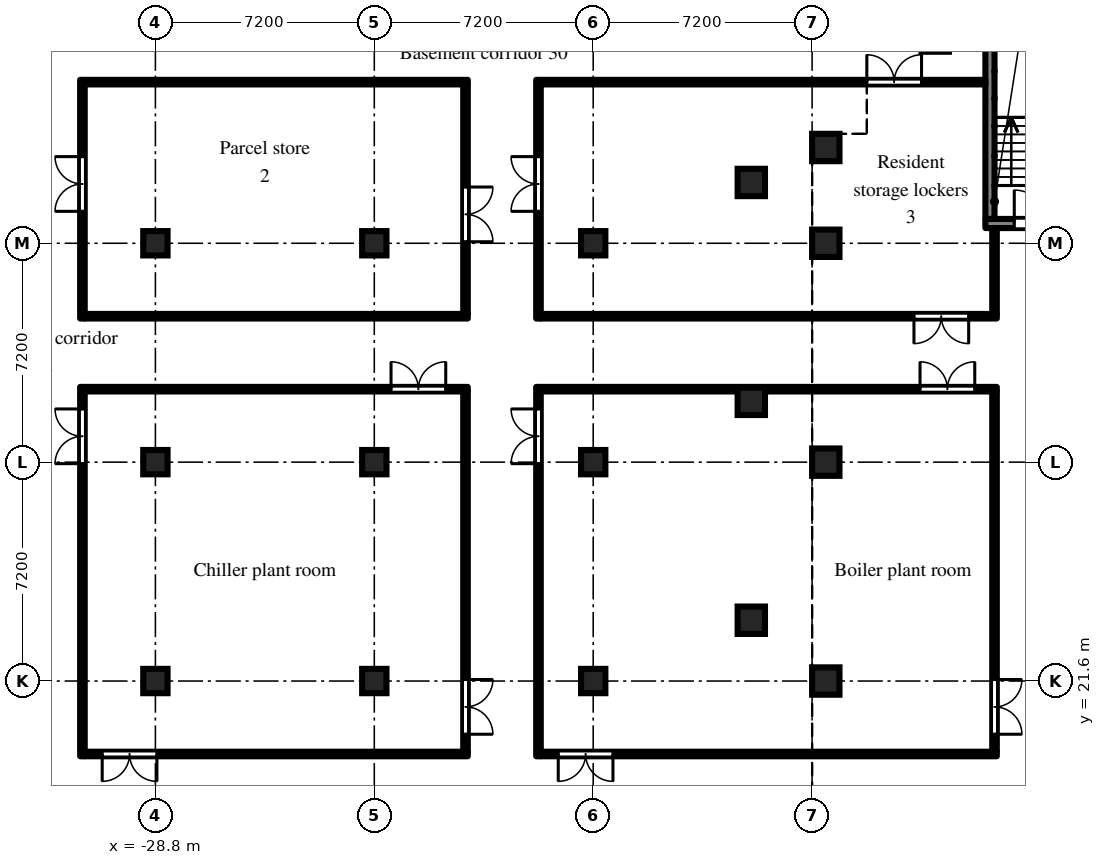
"""IFC4 building model, lengths in metres.
Left out: names, types, materials, properties, quantities, classifications, styles, units other than length and angle.
Written with IfcOpenShell. Run it as: python <this file> out.ifc"""

import sys

from ifc_helpers import new_model, si_unit, direction, frame, frame_2d, origin, origin_2d, place, context, subcontext, project, spatial, rectangle, extrude, element, fill, save


model = new_model("IFC4")
c1 = context("Model", 3, precision=1e-05, world=origin(), true_north=direction((0.0, 1.0)))
c2 = subcontext(c1, "Body", "Model", "MODEL_VIEW")
j1 = project(units=[si_unit("LENGTHUNIT", "METRE"), si_unit("PLANEANGLEUNIT", "RADIAN")], contexts=[c1])
p1 = place(None, origin())
s1 = spatial("IfcSite", under=j1, at=p1, CompositionType="ELEMENT")
p2 = place(p1, origin())
s2 = spatial("IfcBuilding", under=s1, at=p2, CompositionType="ELEMENT")
p3 = place(p2, frame((0.0, 0.0, -4.8)))
s3 = spatial("IfcBuildingStorey", under=s2, at=p3, CompositionType="ELEMENT", Elevation=-4.8)
for number, where, z_axis, x_axis in (
    (1, (-6.75, 21.6, -0.5), (0.0, 0.0, 1.0), (1.0, 0.0, 0.0)),
    (2, (-6.75, 28.8, -0.5), (0.0, 0.0, 1.0), (1.0, 0.0, 0.0)),
    (3, (-6.75, 36.0, -0.5), (0.0, 0.0, 1.0), (1.0, 0.0, 0.0)),
    (4, (-6.75, 39.15, -0.5), (0.0, 0.0, 1.0), (1.0, 0.0, 0.0)),
):
    element("IfcColumn", number, at=place(p3, frame(where, z_axis=z_axis, x_axis=x_axis)), inside=s3, PredefinedType="COLUMN", context=c2, shape_type="SweptSolid", body=[
        extrude(rectangle(XDim=0.9, YDim=0.9, at=origin_2d()), origin(), (0.0, 0.0, 1.0), 5.3),
    ])
for number, where, z_axis, x_axis in (
    (5, (-28.8, 21.6, -0.5), (0.0, 0.0, 1.0), (1.0, 0.0, 0.0)),
    (6, (-28.8, 28.8, -0.5), (0.0, 0.0, 1.0), (1.0, 0.0, 0.0)),
    (7, (-28.8, 36.0, -0.5), (0.0, 0.0, 1.0), (1.0, 0.0, 0.0)),
    (8, (-21.6, 21.6, -0.5), (0.0, 0.0, 1.0), (1.0, 0.0, 0.0)),
    (9, (-21.6, 28.8, -0.5), (0.0, 0.0, 1.0), (1.0, 0.0, 0.0)),
    (10, (-21.6, 36.0, -0.5), (0.0, 0.0, 1.0), (1.0, 0.0, 0.0)),
    (11, (-14.4, 21.6, -0.5), (0.0, 0.0, 1.0), (1.0, 0.0, 0.0)),
    (12, (-14.4, 28.8, -0.5), (0.0, 0.0, 1.0), (1.0, 0.0, 0.0)),
    (13, (-14.4, 36.0, -0.5), (0.0, 0.0, 1.0), (1.0, 0.0, 0.0)),
):
    element("IfcColumn", number, at=place(p3, frame(where, z_axis=z_axis, x_axis=x_axis)), inside=s3, PredefinedType="COLUMN", context=c2, shape_type="SweptSolid", body=[
        extrude(rectangle(XDim=0.8, YDim=0.8, at=origin_2d()), origin(), (0.0, 0.0, 1.0), 5.3),
    ])
for number, where, z_axis, x_axis in (
    (14, (-9.2, 23.6, -0.5), (0.0, 0.0, 1.0), (1.0, 0.0, 0.0)),
    (15, (-9.2, 30.8, -0.5), (0.0, 0.0, 1.0), (1.0, 0.0, 0.0)),
    (16, (-9.2, 38.0, -0.5), (0.0, 0.0, 1.0), (1.0, 0.0, 0.0)),
):
    element("IfcColumn", number, at=place(p3, frame(where, z_axis=z_axis, x_axis=x_axis)), inside=s3, PredefinedType="COLUMN", context=c2, shape_type="SweptSolid", body=[
        extrude(rectangle(XDim=0.9, YDim=0.9, at=origin_2d()), origin(), (0.0, 0.0, 1.0), 5.3),
    ])
p4 = place(p3, frame((-1.5, 36.65, 0.0), z_axis=(0.0, 0.0, 1.0), x_axis=(1.0, 0.0, 0.0)))
e17 = element("IfcWall", 17, at=p4, inside=s3, PredefinedType="SHEAR", context=c2, shape_type="SweptSolid", body=[
    extrude(rectangle(XDim=3.0, YDim=0.3, at=frame_2d((1.5, 0.0))), origin(), (0.0, 0.0, 1.0), 4.35),
])
p5 = place(p4, frame((0.95, 0.0, 0.0)))
e18 = element("IfcOpeningElement", 18, at=p5, cuts=e17, PredefinedType="OPENING", context=c2, shape_type="SweptSolid", body=[
    extrude(rectangle(XDim=1.1, YDim=2.1, at=frame_2d((0.55, 1.05))), frame((0.0, 0.16, 0.0), z_axis=(0.0, -1.0, 0.0), x_axis=(1.0, 0.0, 0.0)), (0.0, 0.0, 1.0), 0.32),
])
p6 = place(p3, frame((-1.35, 36.8, 0.0), z_axis=(0.0, 0.0, 1.0), x_axis=(0.0, 1.0, 0.0)))
e19 = element("IfcWall", 19, at=p6, inside=s3, PredefinedType="SHEAR", context=c2, shape_type="SweptSolid", body=[
    extrude(rectangle(XDim=5.8, YDim=0.3, at=frame_2d((2.9, 0.0))), origin(), (0.0, 0.0, 1.0), 4.35),
])
p7 = place(p3, frame((-31.2, 19.125, 0.0), z_axis=(0.0, 0.0, 1.0), x_axis=(0.0, 1.0, 0.0)))
e20 = element("IfcWall", 20, at=p7, inside=s3, PredefinedType="PARTITIONING", context=c2, shape_type="SweptSolid", body=[
    extrude(rectangle(XDim=12.15, YDim=0.15, at=frame_2d((6.075, 0.0))), origin(), (0.0, 0.0, 1.0), 4.35),
])
p8 = place(p7, frame((9.625, 0.0, 0.0)))
e21 = element("IfcOpeningElement", 21, at=p8, cuts=e20, PredefinedType="OPENING", context=c2, shape_type="SweptSolid", body=[
    extrude(rectangle(XDim=1.8, YDim=2.1, at=frame_2d((0.9, 1.05))), frame((0.0, 0.085, 0.0), z_axis=(0.0, -1.0, 0.0), x_axis=(1.0, 0.0, 0.0)), (0.0, 0.0, 1.0), 0.17),
])
p9 = place(p3, frame((-31.125, 19.2, 0.0), z_axis=(0.0, 0.0, 1.0), x_axis=(1.0, 0.0, 0.0)))
e22 = element("IfcWall", 22, at=p9, inside=s3, PredefinedType="PARTITIONING", context=c2, shape_type="SweptSolid", body=[
    extrude(rectangle(XDim=12.6, YDim=0.15, at=frame_2d((6.3, 0.0))), origin(), (0.0, 0.0, 1.0), 4.35),
])
p10 = place(p9, frame((0.575, 0.0, 0.0)))
e23 = element("IfcOpeningElement", 23, at=p10, cuts=e22, PredefinedType="OPENING", context=c2, shape_type="SweptSolid", body=[
    extrude(rectangle(XDim=1.8, YDim=2.1, at=frame_2d((0.9, 1.05))), frame((0.0, 0.085, 0.0), z_axis=(0.0, -1.0, 0.0), x_axis=(1.0, 0.0, 0.0)), (0.0, 0.0, 1.0), 0.17),
])
p11 = place(p3, frame((-31.125, 31.2, 0.0), z_axis=(0.0, 0.0, 1.0), x_axis=(1.0, 0.0, 0.0)))
e24 = element("IfcWall", 24, at=p11, inside=s3, PredefinedType="PARTITIONING", context=c2, shape_type="SweptSolid", body=[
    extrude(rectangle(XDim=12.6, YDim=0.15, at=frame_2d((6.3, 0.0))), origin(), (0.0, 0.0, 1.0), 4.35),
])
p12 = place(p11, frame((10.075, 0.0, 0.0)))
e25 = element("IfcOpeningElement", 25, at=p12, cuts=e24, PredefinedType="OPENING", context=c2, shape_type="SweptSolid", body=[
    extrude(rectangle(XDim=1.8, YDim=2.1, at=frame_2d((0.9, 1.05))), frame((0.0, 0.085, 0.0), z_axis=(0.0, -1.0, 0.0), x_axis=(1.0, 0.0, 0.0)), (0.0, 0.0, 1.0), 0.17),
])
p13 = place(p3, frame((-31.2, 33.525, 0.0), z_axis=(0.0, 0.0, 1.0), x_axis=(0.0, 1.0, 0.0)))
e26 = element("IfcWall", 26, at=p13, inside=s3, PredefinedType="PARTITIONING", context=c2, shape_type="SweptSolid", body=[
    extrude(rectangle(XDim=7.85, YDim=0.15, at=frame_2d((3.925, 0.0))), origin(), (0.0, 0.0, 1.0), 4.35),
])
p14 = place(p13, frame((3.525, 0.0, 0.0)))
e27 = element("IfcOpeningElement", 27, at=p14, cuts=e26, PredefinedType="OPENING", context=c2, shape_type="SweptSolid", body=[
    extrude(rectangle(XDim=1.8, YDim=2.1, at=frame_2d((0.9, 1.05))), frame((0.0, 0.085, 0.0), z_axis=(0.0, -1.0, 0.0), x_axis=(1.0, 0.0, 0.0)), (0.0, 0.0, 1.0), 0.17),
])
for number, where, z_axis, x_axis in (
    (28, (-31.125, 33.6, 0.0), (0.0, 0.0, 1.0), (1.0, 0.0, 0.0)),
    (29, (-31.125, 41.3, 0.0), (0.0, 0.0, 1.0), (1.0, 0.0, 0.0)),
):
    element("IfcWall", number, at=place(p3, frame(where, z_axis=z_axis, x_axis=x_axis)), inside=s3, PredefinedType="PARTITIONING", context=c2, shape_type="SweptSolid", body=[
        extrude(rectangle(XDim=12.6, YDim=0.15, at=frame_2d((6.3, 0.0))), origin(), (0.0, 0.0, 1.0), 4.35),
    ])
p15 = place(p3, frame((-18.6, 19.275, 0.0), z_axis=(0.0, 0.0, 1.0), x_axis=(0.0, 1.0, 0.0)))
e30 = element("IfcWall", 30, at=p15, inside=s3, PredefinedType="PARTITIONING", context=c2, shape_type="SweptSolid", body=[
    extrude(rectangle(XDim=11.85, YDim=0.15, at=frame_2d((5.925, 0.0))), origin(), (0.0, 0.0, 1.0), 4.35),
])
p16 = place(p15, frame((0.575, 0.0, 0.0)))
e31 = element("IfcOpeningElement", 31, at=p16, cuts=e30, PredefinedType="OPENING", context=c2, shape_type="SweptSolid", body=[
    extrude(rectangle(XDim=1.8, YDim=2.1, at=frame_2d((0.9, 1.05))), frame((0.0, 0.085, 0.0), z_axis=(0.0, -1.0, 0.0), x_axis=(1.0, 0.0, 0.0)), (0.0, 0.0, 1.0), 0.17),
])
p17 = place(p3, frame((-18.6, 33.675, 0.0), z_axis=(0.0, 0.0, 1.0), x_axis=(0.0, 1.0, 0.0)))
e32 = element("IfcWall", 32, at=p17, inside=s3, PredefinedType="PARTITIONING", context=c2, shape_type="SweptSolid", body=[
    extrude(rectangle(XDim=7.55, YDim=0.15, at=frame_2d((3.775, 0.0))), origin(), (0.0, 0.0, 1.0), 4.35),
])
p18 = place(p17, frame((2.375, 0.0, 0.0)))
e33 = element("IfcOpeningElement", 33, at=p18, cuts=e32, PredefinedType="OPENING", context=c2, shape_type="SweptSolid", body=[
    extrude(rectangle(XDim=1.8, YDim=2.1, at=frame_2d((0.9, 1.05))), frame((0.0, 0.085, 0.0), z_axis=(0.0, -1.0, 0.0), x_axis=(1.0, 0.0, 0.0)), (0.0, 0.0, 1.0), 0.17),
])
p19 = place(p3, frame((-16.2, 19.125, 0.0), z_axis=(0.0, 0.0, 1.0), x_axis=(0.0, 1.0, 0.0)))
e34 = element("IfcWall", 34, at=p19, inside=s3, PredefinedType="PARTITIONING", context=c2, shape_type="SweptSolid", body=[
    extrude(rectangle(XDim=12.15, YDim=0.15, at=frame_2d((6.075, 0.0))), origin(), (0.0, 0.0, 1.0), 4.35),
])
p20 = place(p19, frame((9.625, 0.0, 0.0)))
e35 = element("IfcOpeningElement", 35, at=p20, cuts=e34, PredefinedType="OPENING", context=c2, shape_type="SweptSolid", body=[
    extrude(rectangle(XDim=1.8, YDim=2.1, at=frame_2d((0.9, 1.05))), frame((0.0, 0.085, 0.0), z_axis=(0.0, -1.0, 0.0), x_axis=(1.0, 0.0, 0.0)), (0.0, 0.0, 1.0), 0.17),
])
p21 = place(p3, frame((-16.125, 19.2, 0.0), z_axis=(0.0, 0.0, 1.0), x_axis=(1.0, 0.0, 0.0)))
e36 = element("IfcWall", 36, at=p21, inside=s3, PredefinedType="PARTITIONING", context=c2, shape_type="SweptSolid", body=[
    extrude(rectangle(XDim=15.0, YDim=0.15, at=frame_2d((7.5, 0.0))), origin(), (0.0, 0.0, 1.0), 4.35),
])
p22 = place(p21, frame((0.575, 0.0, 0.0)))
e37 = element("IfcOpeningElement", 37, at=p22, cuts=e36, PredefinedType="OPENING", context=c2, shape_type="SweptSolid", body=[
    extrude(rectangle(XDim=1.8, YDim=2.1, at=frame_2d((0.9, 1.05))), frame((0.0, 0.085, 0.0), z_axis=(0.0, -1.0, 0.0), x_axis=(1.0, 0.0, 0.0)), (0.0, 0.0, 1.0), 0.17),
])
p23 = place(p3, frame((-16.125, 31.2, 0.0), z_axis=(0.0, 0.0, 1.0), x_axis=(1.0, 0.0, 0.0)))
e38 = element("IfcWall", 38, at=p23, inside=s3, PredefinedType="PARTITIONING", context=c2, shape_type="SweptSolid", body=[
    extrude(rectangle(XDim=15.0, YDim=0.15, at=frame_2d((7.5, 0.0))), origin(), (0.0, 0.0, 1.0), 4.35),
])
p24 = place(p23, frame((12.475, 0.0, 0.0)))
e39 = element("IfcOpeningElement", 39, at=p24, cuts=e38, PredefinedType="OPENING", context=c2, shape_type="SweptSolid", body=[
    extrude(rectangle(XDim=1.8, YDim=2.1, at=frame_2d((0.9, 1.05))), frame((0.0, 0.085, 0.0), z_axis=(0.0, -1.0, 0.0), x_axis=(1.0, 0.0, 0.0)), (0.0, 0.0, 1.0), 0.17),
])
p25 = place(p3, frame((-16.2, 33.525, 0.0), z_axis=(0.0, 0.0, 1.0), x_axis=(0.0, 1.0, 0.0)))
e40 = element("IfcWall", 40, at=p25, inside=s3, PredefinedType="PARTITIONING", context=c2, shape_type="SweptSolid", body=[
    extrude(rectangle(XDim=7.85, YDim=0.15, at=frame_2d((3.925, 0.0))), origin(), (0.0, 0.0, 1.0), 4.35),
])
p26 = place(p25, frame((3.525, 0.0, 0.0)))
e41 = element("IfcOpeningElement", 41, at=p26, cuts=e40, PredefinedType="OPENING", context=c2, shape_type="SweptSolid", body=[
    extrude(rectangle(XDim=1.8, YDim=2.1, at=frame_2d((0.9, 1.05))), frame((0.0, 0.085, 0.0), z_axis=(0.0, -1.0, 0.0), x_axis=(1.0, 0.0, 0.0)), (0.0, 0.0, 1.0), 0.17),
])
p27 = place(p3, frame((-16.125, 33.6, 0.0), z_axis=(0.0, 0.0, 1.0), x_axis=(1.0, 0.0, 0.0)))
e42 = element("IfcWall", 42, at=p27, inside=s3, PredefinedType="PARTITIONING", context=c2, shape_type="SweptSolid", body=[
    extrude(rectangle(XDim=15.0, YDim=0.15, at=frame_2d((7.5, 0.0))), origin(), (0.0, 0.0, 1.0), 4.35),
])
p28 = place(p27, frame((12.275, 0.0, 0.0)))
e43 = element("IfcOpeningElement", 43, at=p28, cuts=e42, PredefinedType="OPENING", context=c2, shape_type="SweptSolid", body=[
    extrude(rectangle(XDim=1.8, YDim=2.1, at=frame_2d((0.9, 1.05))), frame((0.0, 0.085, 0.0), z_axis=(0.0, -1.0, 0.0), x_axis=(1.0, 0.0, 0.0)), (0.0, 0.0, 1.0), 0.17),
])
p29 = place(p3, frame((-16.125, 41.3, 0.0), z_axis=(0.0, 0.0, 1.0), x_axis=(1.0, 0.0, 0.0)))
e44 = element("IfcWall", 44, at=p29, inside=s3, PredefinedType="PARTITIONING", context=c2, shape_type="SweptSolid", body=[
    extrude(rectangle(XDim=14.625, YDim=0.15, at=frame_2d((7.312, 0.0))), origin(), (0.0, 0.0, 1.0), 4.35),
])
p30 = place(p29, frame((10.725, 0.0, 0.0)))
e45 = element("IfcOpeningElement", 45, at=p30, cuts=e44, PredefinedType="OPENING", context=c2, shape_type="SweptSolid", body=[
    extrude(rectangle(XDim=1.8, YDim=2.1, at=frame_2d((0.9, 1.05))), frame((0.0, 0.085, 0.0), z_axis=(0.0, -1.0, 0.0), x_axis=(1.0, 0.0, 0.0)), (0.0, 0.0, 1.0), 0.17),
])
p31 = place(p3, frame((-1.2, 19.275, 0.0), z_axis=(0.0, 0.0, 1.0), x_axis=(0.0, 1.0, 0.0)))
e46 = element("IfcWall", 46, at=p31, inside=s3, PredefinedType="PARTITIONING", context=c2, shape_type="SweptSolid", body=[
    extrude(rectangle(XDim=11.85, YDim=0.15, at=frame_2d((5.925, 0.0))), origin(), (0.0, 0.0, 1.0), 4.35),
])
p32 = place(p31, frame((0.575, 0.0, 0.0)))
e47 = element("IfcOpeningElement", 47, at=p32, cuts=e46, PredefinedType="OPENING", context=c2, shape_type="SweptSolid", body=[
    extrude(rectangle(XDim=1.8, YDim=2.1, at=frame_2d((0.9, 1.05))), frame((0.0, 0.085, 0.0), z_axis=(0.0, -1.0, 0.0), x_axis=(1.0, 0.0, 0.0)), (0.0, 0.0, 1.0), 0.17),
])
p33 = place(p3, frame((-1.2, 33.675, 0.0), z_axis=(0.0, 0.0, 1.0), x_axis=(0.0, 1.0, 0.0)))
e48 = element("IfcWall", 48, at=p33, inside=s3, PredefinedType="PARTITIONING", context=c2, shape_type="SweptSolid", body=[
    extrude(rectangle(XDim=2.825, YDim=0.15, at=frame_2d((1.413, 0.0))), origin(), (0.0, 0.0, 1.0), 4.35),
])
p34 = place(p5, origin())
e49 = element("IfcDoor", 49, at=p34, inside=s3, OperationType="SINGLE_SWING_LEFT", PredefinedType="DOOR", context=c2, shape_type="SweptSolid", body=[
    extrude(rectangle(XDim=1.1, YDim=2.1, at=frame_2d((0.55, 1.05))), frame((0.0, 0.025, 0.0), z_axis=(0.0, -1.0, 0.0), x_axis=(1.0, 0.0, 0.0)), (0.0, 0.0, 1.0), 0.05),
])
fill(e18, e49)
p35 = place(p20, origin())
e50 = element("IfcDoor", 50, at=p35, inside=s3, OperationType="DOUBLE_DOOR_DOUBLE_SWING", PredefinedType="DOOR", context=c2, shape_type="SweptSolid", body=[
    extrude(rectangle(XDim=1.8, YDim=2.1, at=frame_2d((0.9, 1.05))), frame((0.0, 0.025, 0.0), z_axis=(0.0, -1.0, 0.0), x_axis=(1.0, 0.0, 0.0)), (0.0, 0.0, 1.0), 0.05),
])
fill(e35, e50)
p36 = place(p22, frame((1.8, 0.0, 0.0), z_axis=(0.0, 0.0, 1.0), x_axis=(-1.0, 0.0, 0.0)))
e51 = element("IfcDoor", 51, at=p36, inside=s3, OperationType="DOUBLE_DOOR_DOUBLE_SWING", PredefinedType="DOOR", context=c2, shape_type="SweptSolid", body=[
    extrude(rectangle(XDim=1.8, YDim=2.1, at=frame_2d((0.9, 1.05))), frame((0.0, 0.025, 0.0), z_axis=(0.0, -1.0, 0.0), x_axis=(1.0, 0.0, 0.0)), (0.0, 0.0, 1.0), 0.05),
])
fill(e37, e51)
p37 = place(p24, origin())
e52 = element("IfcDoor", 52, at=p37, inside=s3, OperationType="DOUBLE_DOOR_DOUBLE_SWING", PredefinedType="DOOR", context=c2, shape_type="SweptSolid", body=[
    extrude(rectangle(XDim=1.8, YDim=2.1, at=frame_2d((0.9, 1.05))), frame((0.0, 0.025, 0.0), z_axis=(0.0, -1.0, 0.0), x_axis=(1.0, 0.0, 0.0)), (0.0, 0.0, 1.0), 0.05),
])
fill(e39, e52)
p38 = place(p32, frame((1.8, 0.0, 0.0), z_axis=(0.0, 0.0, 1.0), x_axis=(-1.0, 0.0, 0.0)))
e53 = element("IfcDoor", 53, at=p38, inside=s3, OperationType="DOUBLE_DOOR_DOUBLE_SWING", PredefinedType="DOOR", context=c2, shape_type="SweptSolid", body=[
    extrude(rectangle(XDim=1.8, YDim=2.1, at=frame_2d((0.9, 1.05))), frame((0.0, 0.025, 0.0), z_axis=(0.0, -1.0, 0.0), x_axis=(1.0, 0.0, 0.0)), (0.0, 0.0, 1.0), 0.05),
])
fill(e47, e53)
p39 = place(p8, origin())
e54 = element("IfcDoor", 54, at=p39, inside=s3, OperationType="DOUBLE_DOOR_DOUBLE_SWING", PredefinedType="DOOR", context=c2, shape_type="SweptSolid", body=[
    extrude(rectangle(XDim=1.8, YDim=2.1, at=frame_2d((0.9, 1.05))), frame((0.0, 0.025, 0.0), z_axis=(0.0, -1.0, 0.0), x_axis=(1.0, 0.0, 0.0)), (0.0, 0.0, 1.0), 0.05),
])
fill(e21, e54)
p40 = place(p10, frame((1.8, 0.0, 0.0), z_axis=(0.0, 0.0, 1.0), x_axis=(-1.0, 0.0, 0.0)))
e55 = element("IfcDoor", 55, at=p40, inside=s3, OperationType="DOUBLE_DOOR_DOUBLE_SWING", PredefinedType="DOOR", context=c2, shape_type="SweptSolid", body=[
    extrude(rectangle(XDim=1.8, YDim=2.1, at=frame_2d((0.9, 1.05))), frame((0.0, 0.025, 0.0), z_axis=(0.0, -1.0, 0.0), x_axis=(1.0, 0.0, 0.0)), (0.0, 0.0, 1.0), 0.05),
])
fill(e23, e55)
p41 = place(p12, origin())
e56 = element("IfcDoor", 56, at=p41, inside=s3, OperationType="DOUBLE_DOOR_DOUBLE_SWING", PredefinedType="DOOR", context=c2, shape_type="SweptSolid", body=[
    extrude(rectangle(XDim=1.8, YDim=2.1, at=frame_2d((0.9, 1.05))), frame((0.0, 0.025, 0.0), z_axis=(0.0, -1.0, 0.0), x_axis=(1.0, 0.0, 0.0)), (0.0, 0.0, 1.0), 0.05),
])
fill(e25, e56)
p42 = place(p16, frame((1.8, 0.0, 0.0), z_axis=(0.0, 0.0, 1.0), x_axis=(-1.0, 0.0, 0.0)))
e57 = element("IfcDoor", 57, at=p42, inside=s3, OperationType="DOUBLE_DOOR_DOUBLE_SWING", PredefinedType="DOOR", context=c2, shape_type="SweptSolid", body=[
    extrude(rectangle(XDim=1.8, YDim=2.1, at=frame_2d((0.9, 1.05))), frame((0.0, 0.025, 0.0), z_axis=(0.0, -1.0, 0.0), x_axis=(1.0, 0.0, 0.0)), (0.0, 0.0, 1.0), 0.05),
])
fill(e31, e57)
p43 = place(p14, origin())
e58 = element("IfcDoor", 58, at=p43, inside=s3, OperationType="DOUBLE_DOOR_DOUBLE_SWING", PredefinedType="DOOR", context=c2, shape_type="SweptSolid", body=[
    extrude(rectangle(XDim=1.8, YDim=2.1, at=frame_2d((0.9, 1.05))), frame((0.0, 0.025, 0.0), z_axis=(0.0, -1.0, 0.0), x_axis=(1.0, 0.0, 0.0)), (0.0, 0.0, 1.0), 0.05),
])
fill(e27, e58)
p44 = place(p18, frame((1.8, 0.0, 0.0), z_axis=(0.0, 0.0, 1.0), x_axis=(-1.0, 0.0, 0.0)))
e59 = element("IfcDoor", 59, at=p44, inside=s3, OperationType="DOUBLE_DOOR_DOUBLE_SWING", PredefinedType="DOOR", context=c2, shape_type="SweptSolid", body=[
    extrude(rectangle(XDim=1.8, YDim=2.1, at=frame_2d((0.9, 1.05))), frame((0.0, 0.025, 0.0), z_axis=(0.0, -1.0, 0.0), x_axis=(1.0, 0.0, 0.0)), (0.0, 0.0, 1.0), 0.05),
])
fill(e33, e59)
p45 = place(p26, origin())
e60 = element("IfcDoor", 60, at=p45, inside=s3, OperationType="DOUBLE_DOOR_DOUBLE_SWING", PredefinedType="DOOR", context=c2, shape_type="SweptSolid", body=[
    extrude(rectangle(XDim=1.8, YDim=2.1, at=frame_2d((0.9, 1.05))), frame((0.0, 0.025, 0.0), z_axis=(0.0, -1.0, 0.0), x_axis=(1.0, 0.0, 0.0)), (0.0, 0.0, 1.0), 0.05),
])
fill(e41, e60)
p46 = place(p30, origin())
e61 = element("IfcDoor", 61, at=p46, inside=s3, OperationType="DOUBLE_DOOR_DOUBLE_SWING", PredefinedType="DOOR", context=c2, shape_type="SweptSolid", body=[
    extrude(rectangle(XDim=1.8, YDim=2.1, at=frame_2d((0.9, 1.05))), frame((0.0, 0.025, 0.0), z_axis=(0.0, -1.0, 0.0), x_axis=(1.0, 0.0, 0.0)), (0.0, 0.0, 1.0), 0.05),
])
fill(e45, e61)
p47 = place(p28, frame((1.8, 0.0, 0.0), z_axis=(0.0, 0.0, 1.0), x_axis=(-1.0, 0.0, 0.0)))
e62 = element("IfcDoor", 62, at=p47, inside=s3, OperationType="DOUBLE_DOOR_DOUBLE_SWING", PredefinedType="DOOR", context=c2, shape_type="SweptSolid", body=[
    extrude(rectangle(XDim=1.8, YDim=2.1, at=frame_2d((0.9, 1.05))), frame((0.0, 0.025, 0.0), z_axis=(0.0, -1.0, 0.0), x_axis=(1.0, 0.0, 0.0)), (0.0, 0.0, 1.0), 0.05),
])
fill(e43, e62)
save(model, sys.argv[1])
